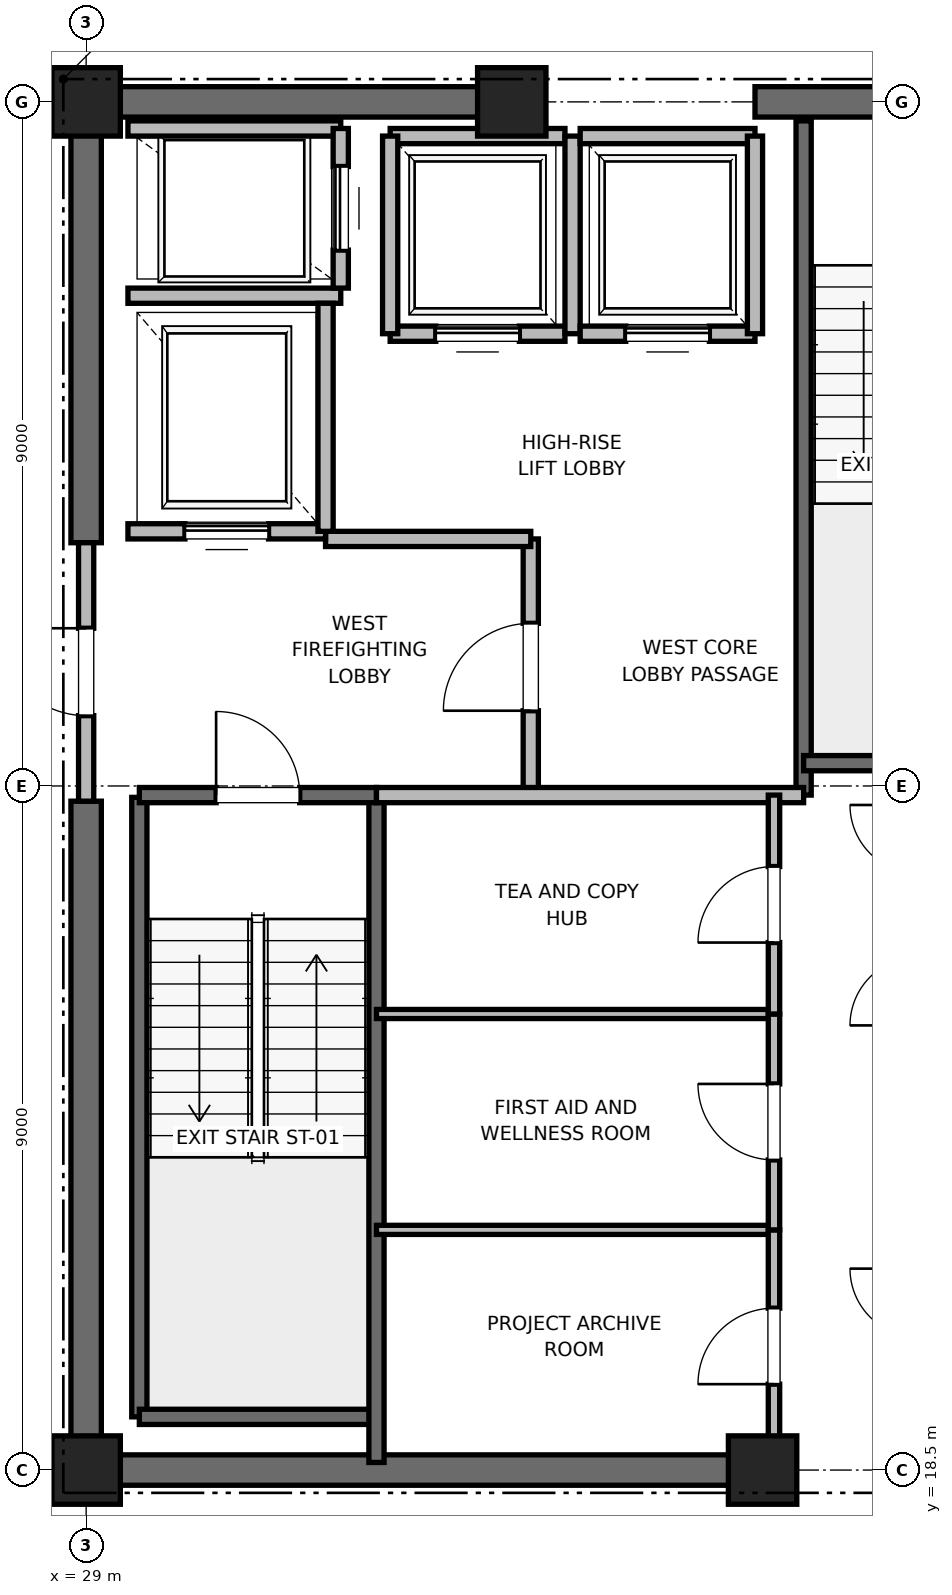
"""IFC4 building model, lengths in metres.
Left out: names, types, materials, properties, quantities, classifications, styles, units other than length and angle.
Written with IfcOpenShell. Run it as: python <this file> out.ifc"""

import sys

from ifc_helpers import new_model, si_unit, direction, frame, frame_2d, origin, origin_2d, place, context, subcontext, project, spatial, rectangle, extrude, element, fill, save


model = new_model("IFC4")
c1 = context("Model", 3, precision=1e-05, world=origin(), true_north=direction((0.0, 1.0)))
c2 = subcontext(c1, "Body", "Model", "MODEL_VIEW")
j1 = project(units=[si_unit("LENGTHUNIT", "METRE"), si_unit("PLANEANGLEUNIT", "RADIAN")], contexts=[c1])
p1 = place(None, origin())
s1 = spatial("IfcSite", under=j1, at=p1, CompositionType="ELEMENT")
p2 = place(p1, origin())
s2 = spatial("IfcBuilding", under=s1, at=p2, CompositionType="ELEMENT")
p3 = place(p2, frame((0.0, 0.0, 330.8)))
s3 = spatial("IfcBuildingStorey", under=s2, at=p3, CompositionType="ELEMENT", Elevation=330.8)
for number, where, z_axis, x_axis in (
    (1, (29.0, 18.5, 0.0), (0.0, 0.0, 1.0), (1.0, 0.0, 0.0)),
    (2, (29.0, 36.5, 0.0), (0.0, 0.0, 1.0), (1.0, 0.0, 0.0)),
    (3, (37.9, 18.5, 0.0), (0.0, 0.0, 1.0), (1.0, 0.0, 0.0)),
    (4, (34.6, 36.5, 0.0), (0.0, 0.0, 1.0), (1.0, 0.0, 0.0)),
):
    element("IfcColumn", number, at=place(p3, frame(where, z_axis=z_axis, x_axis=x_axis)), inside=s3, PredefinedType="PILASTER", context=c2, shape_type="SweptSolid", body=[
        extrude(rectangle(XDim=0.9, YDim=0.9, at=origin_2d()), origin(), (0.0, 0.0, 1.0), 4.0),
    ])
p4 = place(p3, frame((29.0, 18.5, 0.0), z_axis=(0.0, 0.0, 1.0), x_axis=(1.0, 0.0, 0.0)))
e5 = element("IfcWall", 5, at=p4, inside=s3, PredefinedType="SHEAR", context=c2, shape_type="SweptSolid", body=[
    extrude(rectangle(XDim=9.2, YDim=0.4, at=frame_2d((4.6, 0.0))), origin(), (0.0, 0.0, 1.0), 3.785),
])
p5 = place(p3, frame((29.0, 36.5, 0.0), z_axis=(0.0, 0.0, 1.0), x_axis=(1.0, 0.0, 0.0)))
e6 = element("IfcWall", 6, at=p5, inside=s3, PredefinedType="SHEAR", context=c2, shape_type="SweptSolid", body=[
    extrude(rectangle(XDim=5.8, YDim=0.4, at=frame_2d((2.9, 0.0))), origin(), (0.0, 0.0, 1.0), 3.785),
])
p6 = place(p3, frame((37.8, 36.5, 0.0), z_axis=(0.0, 0.0, 1.0), x_axis=(1.0, 0.0, 0.0)))
e7 = element("IfcWall", 7, at=p6, inside=s3, PredefinedType="SHEAR", context=c2, shape_type="SweptSolid", body=[
    extrude(rectangle(XDim=4.4, YDim=0.4, at=frame_2d((2.2, 0.0))), origin(), (0.0, 0.0, 1.0), 3.785),
])
p7 = place(p6, frame((1.65, 0.0, 0.0)))
e8 = element("IfcOpeningElement", 8, at=p7, cuts=e7, PredefinedType="OPENING", context=c2, shape_type="SweptSolid", body=[
    extrude(rectangle(XDim=1.1, YDim=2.15, at=frame_2d((0.55, 1.075))), frame((0.0, 0.2, 0.0), z_axis=(0.0, -1.0, 0.0), x_axis=(1.0, 0.0, 0.0)), (0.0, 0.0, 1.0), 0.4),
])
p8 = place(p3, frame((29.0, 18.5, 0.0), z_axis=(0.0, 0.0, 1.0), x_axis=(0.0, 1.0, 0.0)))
e9 = element("IfcWall", 9, at=p8, inside=s3, PredefinedType="SHEAR", context=c2, shape_type="SweptSolid", body=[
    extrude(rectangle(XDim=8.8, YDim=0.4, at=frame_2d((4.4, 0.0))), origin(), (0.0, 0.0, 1.0), 3.785),
])
p9 = place(p3, frame((29.0, 30.7, 0.0), z_axis=(0.0, 0.0, 1.0), x_axis=(0.0, 1.0, 0.0)))
e10 = element("IfcWall", 10, at=p9, inside=s3, PredefinedType="SHEAR", context=c2, shape_type="SweptSolid", body=[
    extrude(rectangle(XDim=5.8, YDim=0.4, at=frame_2d((2.9, 0.0))), origin(), (0.0, 0.0, 1.0), 3.785),
])
p10 = place(p3, frame((29.7, 19.2, 0.0), z_axis=(0.0, 0.0, 1.0), x_axis=(0.0, 1.0, 0.0)))
e11 = element("IfcWall", 11, at=p10, inside=s3, PredefinedType="SOLIDWALL", context=c2, shape_type="SweptSolid", body=[
    extrude(rectangle(XDim=8.15, YDim=0.2, at=frame_2d((4.075, 0.0))), origin(), (0.0, 0.0, 1.0), 3.785),
])
p11 = place(p3, frame((29.7, 19.2, 0.0), z_axis=(0.0, 0.0, 1.0), x_axis=(1.0, 0.0, 0.0)))
e12 = element("IfcWall", 12, at=p11, inside=s3, PredefinedType="SOLIDWALL", context=c2, shape_type="SweptSolid", body=[
    extrude(rectangle(XDim=3.12, YDim=0.2, at=frame_2d((1.56, 0.0))), origin(), (0.0, 0.0, 1.0), 3.785),
])
p12 = place(p3, frame((32.82, 18.6, 0.0), z_axis=(0.0, 0.0, 1.0), x_axis=(0.0, 1.0, 0.0)))
e13 = element("IfcWall", 13, at=p12, inside=s3, PredefinedType="SOLIDWALL", context=c2, shape_type="SweptSolid", body=[
    extrude(rectangle(XDim=8.78, YDim=0.2, at=frame_2d((4.39, 0.0))), origin(), (0.0, 0.0, 1.0), 3.785),
])
p13 = place(p3, frame((29.7, 27.38, 0.0), z_axis=(0.0, 0.0, 1.0), x_axis=(1.0, 0.0, 0.0)))
e14 = element("IfcWall", 14, at=p13, inside=s3, PredefinedType="SOLIDWALL", context=c2, shape_type="SweptSolid", body=[
    extrude(rectangle(XDim=3.12, YDim=0.2, at=frame_2d((1.56, 0.0))), origin(), (0.0, 0.0, 1.0), 3.785),
])
p14 = place(p13, frame((1.01, 0.0, 0.0)))
e15 = element("IfcOpeningElement", 15, at=p14, cuts=e14, PredefinedType="OPENING", context=c2, shape_type="SweptSolid", body=[
    extrude(rectangle(XDim=1.1, YDim=2.15, at=frame_2d((0.55, 1.075))), frame((0.0, 0.1, 0.0), z_axis=(0.0, -1.0, 0.0), x_axis=(1.0, 0.0, 0.0)), (0.0, 0.0, 1.0), 0.2),
])
p15 = place(p3, frame((38.44, 27.38, 0.0), z_axis=(0.0, 0.0, 1.0), x_axis=(0.0, 1.0, 0.0)))
e16 = element("IfcWall", 16, at=p15, inside=s3, PredefinedType="SOLIDWALL", context=c2, shape_type="SweptSolid", body=[
    extrude(rectangle(XDim=8.87, YDim=0.2, at=frame_2d((4.435, 0.0))), origin(), (0.0, 0.0, 1.0), 3.785),
])
p16 = place(p3, frame((38.44, 27.8, 0.0), z_axis=(0.0, 0.0, 1.0), x_axis=(1.0, 0.0, 0.0)))
e17 = element("IfcWall", 17, at=p16, inside=s3, PredefinedType="SOLIDWALL", context=c2, shape_type="SweptSolid", body=[
    extrude(rectangle(XDim=3.32, YDim=0.2, at=frame_2d((1.66, 0.0))), origin(), (0.0, 0.0, 1.0), 3.785),
])
p17 = place(p3, frame((34.85, 27.38, 0.0), z_axis=(0.0, 0.0, 1.0), x_axis=(0.0, 1.0, 0.0)))
e18 = element("IfcWall", 18, at=p17, inside=s3, PredefinedType="PARTITIONING", context=c2, shape_type="SweptSolid", body=[
    extrude(rectangle(XDim=3.37, YDim=0.2, at=frame_2d((1.685, 0.0))), origin(), (0.0, 0.0, 1.0), 3.785),
])
p18 = place(p17, frame((1.11, 0.0, 0.0)))
e19 = element("IfcOpeningElement", 19, at=p18, cuts=e18, PredefinedType="OPENING", context=c2, shape_type="SweptSolid", body=[
    extrude(rectangle(XDim=1.15, YDim=2.2, at=frame_2d((0.575, 1.1))), frame((0.0, 0.1, 0.0), z_axis=(0.0, -1.0, 0.0), x_axis=(1.0, 0.0, 0.0)), (0.0, 0.0, 1.0), 0.2),
])
p19 = place(p3, frame((29.0, 27.3, 0.0), z_axis=(0.0, 0.0, 1.0), x_axis=(0.0, 1.0, 0.0)))
e20 = element("IfcWall", 20, at=p19, inside=s3, PredefinedType="PARTITIONING", context=c2, shape_type="SweptSolid", body=[
    extrude(rectangle(XDim=3.4, YDim=0.2, at=frame_2d((1.7, 0.0))), origin(), (0.0, 0.0, 1.0), 2.865),
])
p20 = place(p19, frame((1.125, 0.0, 0.0)))
e21 = element("IfcOpeningElement", 21, at=p20, cuts=e20, PredefinedType="OPENING", context=c2, shape_type="SweptSolid", body=[
    extrude(rectangle(XDim=1.15, YDim=2.2, at=frame_2d((0.575, 1.1))), frame((0.0, 0.1, 0.0), z_axis=(0.0, -1.0, 0.0), x_axis=(1.0, 0.0, 0.0)), (0.0, 0.0, 1.0), 0.2),
])
p21 = place(p3, frame((32.82, 27.38, 0.0), z_axis=(0.0, 0.0, 1.0), x_axis=(1.0, 0.0, 0.0)))
e22 = element("IfcWall", 22, at=p21, inside=s3, PredefinedType="PARTITIONING", context=c2, shape_type="SweptSolid", body=[
    extrude(rectangle(XDim=5.62, YDim=0.2, at=frame_2d((2.81, 0.0))), origin(), (0.0, 0.0, 1.0), 3.785),
])
p22 = place(p3, frame((32.15, 30.75, 0.0), z_axis=(0.0, 0.0, 1.0), x_axis=(1.0, 0.0, 0.0)))
e23 = element("IfcWall", 23, at=p22, inside=s3, PredefinedType="PARTITIONING", context=c2, shape_type="SweptSolid", body=[
    extrude(rectangle(XDim=2.7, YDim=0.2, at=frame_2d((1.35, 0.0))), origin(), (0.0, 0.0, 1.0), 3.785),
])
p23 = place(p3, frame((29.55, 30.85, 0.0), z_axis=(0.0, 0.0, 1.0), x_axis=(1.0, 0.0, 0.0)))
e24 = element("IfcWall", 24, at=p23, inside=s3, PredefinedType="SOLIDWALL", context=c2, shape_type="SweptSolid", body=[
    extrude(rectangle(XDim=2.6, YDim=0.2, at=frame_2d((1.3, 0.0))), origin(), (0.0, 0.0, 1.0), 2.865),
])
p24 = place(p23, frame((0.75, 0.0, 0.0)))
e25 = element("IfcOpeningElement", 25, at=p24, cuts=e24, PredefinedType="OPENING", context=c2, shape_type="SweptSolid", body=[
    extrude(rectangle(XDim=1.1, YDim=2.2, at=frame_2d((0.55, 1.1))), frame((0.0, 0.1, 0.0), z_axis=(0.0, -1.0, 0.0), x_axis=(1.0, 0.0, 0.0)), (0.0, 0.0, 1.0), 0.2),
])
p25 = place(p3, frame((29.55, 33.95, 0.0), z_axis=(0.0, 0.0, 1.0), x_axis=(1.0, 0.0, 0.0)))
e26 = element("IfcWall", 26, at=p25, inside=s3, PredefinedType="SOLIDWALL", context=c2, shape_type="SweptSolid", body=[
    extrude(rectangle(XDim=2.8, YDim=0.2, at=frame_2d((1.4, 0.0))), origin(), (0.0, 0.0, 1.0), 3.785),
])
p26 = place(p3, frame((32.15, 30.85, 0.0), z_axis=(0.0, 0.0, 1.0), x_axis=(0.0, 1.0, 0.0)))
e27 = element("IfcWall", 27, at=p26, inside=s3, PredefinedType="SOLIDWALL", context=c2, shape_type="SweptSolid", body=[
    extrude(rectangle(XDim=3.0, YDim=0.2, at=frame_2d((1.5, 0.0))), origin(), (0.0, 0.0, 1.0), 3.785),
])
p27 = place(p3, frame((32.35, 36.15, 0.0), z_axis=(0.0, 0.0, 1.0), x_axis=(-1.0, 0.0, 0.0)))
e28 = element("IfcWall", 28, at=p27, inside=s3, PredefinedType="SOLIDWALL", context=c2, shape_type="SweptSolid", body=[
    extrude(rectangle(XDim=2.8, YDim=0.2, at=frame_2d((1.4, 0.0))), origin(), (0.0, 0.0, 1.0), 3.22),
])
p28 = place(p3, frame((32.35, 34.05, 0.0), z_axis=(0.0, 0.0, 1.0), x_axis=(0.0, 1.0, 0.0)))
e29 = element("IfcWall", 29, at=p28, inside=s3, PredefinedType="SOLIDWALL", context=c2, shape_type="SweptSolid", body=[
    extrude(rectangle(XDim=2.1, YDim=0.2, at=frame_2d((1.05, 0.0))), origin(), (0.0, 0.0, 1.0), 3.785),
])
p29 = place(p28, frame((0.5, 0.0, 0.0)))
e30 = element("IfcOpeningElement", 30, at=p29, cuts=e29, PredefinedType="OPENING", context=c2, shape_type="SweptSolid", body=[
    extrude(rectangle(XDim=1.1, YDim=2.2, at=frame_2d((0.55, 1.1))), frame((0.0, 0.1, 0.0), z_axis=(0.0, -1.0, 0.0), x_axis=(1.0, 0.0, 0.0)), (0.0, 0.0, 1.0), 0.2),
])
p30 = place(p3, frame((33.0, 33.45, 0.0), z_axis=(0.0, 0.0, 1.0), x_axis=(1.0, 0.0, 0.0)))
e31 = element("IfcWall", 31, at=p30, inside=s3, PredefinedType="SOLIDWALL", context=c2, shape_type="SweptSolid", body=[
    extrude(rectangle(XDim=2.3, YDim=0.2, at=frame_2d((1.15, 0.0))), origin(), (0.0, 0.0, 1.0), 3.785),
])
p31 = place(p30, frame((0.6, 0.0, 0.0)))
e32 = element("IfcOpeningElement", 32, at=p31, cuts=e31, PredefinedType="OPENING", context=c2, shape_type="SweptSolid", body=[
    extrude(rectangle(XDim=1.1, YDim=2.2, at=frame_2d((0.55, 1.1))), frame((0.0, 0.1, 0.0), z_axis=(0.0, -1.0, 0.0), x_axis=(1.0, 0.0, 0.0)), (0.0, 0.0, 1.0), 0.2),
])
p32 = place(p3, frame((35.3, 36.05, 0.0), z_axis=(0.0, 0.0, 1.0), x_axis=(-1.0, 0.0, 0.0)))
e33 = element("IfcWall", 33, at=p32, inside=s3, PredefinedType="SOLIDWALL", context=c2, shape_type="SweptSolid", body=[
    extrude(rectangle(XDim=2.3, YDim=0.2, at=frame_2d((1.15, 0.0))), origin(), (0.0, 0.0, 1.0), 2.865),
])
p33 = place(p3, frame((33.0, 36.05, 0.0), z_axis=(0.0, 0.0, 1.0), x_axis=(0.0, -1.0, 0.0)))
e34 = element("IfcWall", 34, at=p33, inside=s3, PredefinedType="SOLIDWALL", context=c2, shape_type="SweptSolid", body=[
    extrude(rectangle(XDim=2.6, YDim=0.2, at=frame_2d((1.3, 0.0))), origin(), (0.0, 0.0, 1.0), 3.785),
])
p34 = place(p3, frame((35.4, 33.45, 0.0), z_axis=(0.0, 0.0, 1.0), x_axis=(0.0, 1.0, 0.0)))
e35 = element("IfcWall", 35, at=p34, inside=s3, PredefinedType="SOLIDWALL", context=c2, shape_type="SweptSolid", body=[
    extrude(rectangle(XDim=2.6, YDim=0.2, at=frame_2d((1.3, 0.0))), origin(), (0.0, 0.0, 1.0), 2.865),
])
p35 = place(p3, frame((35.5, 33.45, 0.0), z_axis=(0.0, 0.0, 1.0), x_axis=(1.0, 0.0, 0.0)))
e36 = element("IfcWall", 36, at=p35, inside=s3, PredefinedType="SOLIDWALL", context=c2, shape_type="SweptSolid", body=[
    extrude(rectangle(XDim=2.3, YDim=0.2, at=frame_2d((1.15, 0.0))), origin(), (0.0, 0.0, 1.0), 3.785),
])
p36 = place(p35, frame((0.6, 0.0, 0.0)))
e37 = element("IfcOpeningElement", 37, at=p36, cuts=e36, PredefinedType="OPENING", context=c2, shape_type="SweptSolid", body=[
    extrude(rectangle(XDim=1.1, YDim=2.2, at=frame_2d((0.55, 1.1))), frame((0.0, 0.1, 0.0), z_axis=(0.0, -1.0, 0.0), x_axis=(1.0, 0.0, 0.0)), (0.0, 0.0, 1.0), 0.2),
])
p37 = place(p3, frame((37.8, 36.05, 0.0), z_axis=(0.0, 0.0, 1.0), x_axis=(-1.0, 0.0, 0.0)))
e38 = element("IfcWall", 38, at=p37, inside=s3, PredefinedType="SOLIDWALL", context=c2, shape_type="SweptSolid", body=[
    extrude(rectangle(XDim=2.3, YDim=0.2, at=frame_2d((1.15, 0.0))), origin(), (0.0, 0.0, 1.0), 2.865),
])
p38 = place(p3, frame((37.8, 33.45, 0.0), z_axis=(0.0, 0.0, 1.0), x_axis=(0.0, 1.0, 0.0)))
e39 = element("IfcWall", 39, at=p38, inside=s3, PredefinedType="SOLIDWALL", context=c2, shape_type="SweptSolid", body=[
    extrude(rectangle(XDim=2.6, YDim=0.2, at=frame_2d((1.3, 0.0))), origin(), (0.0, 0.0, 1.0), 2.865),
])
for number, where, z_axis, x_axis in (
    (40, (32.82, 21.66, 0.0), (0.0, 0.0, 1.0), (1.0, 0.0, 0.0)),
    (41, (32.82, 24.5, 0.0), (0.0, 0.0, 1.0), (1.0, 0.0, 0.0)),
):
    element("IfcWall", number, at=place(p3, frame(where, z_axis=z_axis, x_axis=x_axis)), inside=s3, PredefinedType="PARTITIONING", context=c2, shape_type="SweptSolid", body=[
        extrude(rectangle(XDim=5.23, YDim=0.12, at=frame_2d((2.615, 0.0))), origin(), (0.0, 0.0, 1.0), 2.85),
    ])
p39 = place(p3, frame((38.05, 18.6, 0.0), z_axis=(0.0, 0.0, 1.0), x_axis=(0.0, 1.0, 0.0)))
e42 = element("IfcWall", 42, at=p39, inside=s3, PredefinedType="PARTITIONING", context=c2, shape_type="SweptSolid", body=[
    extrude(rectangle(XDim=3.06, YDim=0.15, at=frame_2d((1.53, 0.0))), origin(), (0.0, 0.0, 1.0), 2.85),
])
p40 = place(p39, frame((1.03, 0.0, 0.0)))
e43 = element("IfcOpeningElement", 43, at=p40, cuts=e42, PredefinedType="OPENING", context=c2, shape_type="SweptSolid", body=[
    extrude(rectangle(XDim=1.0, YDim=2.15, at=frame_2d((0.5, 1.075))), frame((0.0, 0.075, 0.0), z_axis=(0.0, -1.0, 0.0), x_axis=(1.0, 0.0, 0.0)), (0.0, 0.0, 1.0), 0.15),
])
p41 = place(p3, frame((38.05, 21.66, 0.0), z_axis=(0.0, 0.0, 1.0), x_axis=(0.0, 1.0, 0.0)))
e44 = element("IfcWall", 44, at=p41, inside=s3, PredefinedType="PARTITIONING", context=c2, shape_type="SweptSolid", body=[
    extrude(rectangle(XDim=2.84, YDim=0.15, at=frame_2d((1.42, 0.0))), origin(), (0.0, 0.0, 1.0), 2.85),
])
p42 = place(p41, frame((0.92, 0.0, 0.0)))
e45 = element("IfcOpeningElement", 45, at=p42, cuts=e44, PredefinedType="OPENING", context=c2, shape_type="SweptSolid", body=[
    extrude(rectangle(XDim=1.0, YDim=2.15, at=frame_2d((0.5, 1.075))), frame((0.0, 0.075, 0.0), z_axis=(0.0, -1.0, 0.0), x_axis=(1.0, 0.0, 0.0)), (0.0, 0.0, 1.0), 0.15),
])
p43 = place(p3, frame((38.05, 24.5, 0.0), z_axis=(0.0, 0.0, 1.0), x_axis=(0.0, 1.0, 0.0)))
e46 = element("IfcWall", 46, at=p43, inside=s3, PredefinedType="PARTITIONING", context=c2, shape_type="SweptSolid", body=[
    extrude(rectangle(XDim=2.88, YDim=0.15, at=frame_2d((1.44, 0.0))), origin(), (0.0, 0.0, 1.0), 2.85),
])
p44 = place(p43, frame((0.94, 0.0, 0.0)))
e47 = element("IfcOpeningElement", 47, at=p44, cuts=e46, PredefinedType="OPENING", context=c2, shape_type="SweptSolid", body=[
    extrude(rectangle(XDim=1.0, YDim=2.15, at=frame_2d((0.5, 1.075))), frame((0.0, 0.075, 0.0), z_axis=(0.0, -1.0, 0.0), x_axis=(1.0, 0.0, 0.0)), (0.0, 0.0, 1.0), 0.15),
])
p45 = place(p14, origin())
e48 = element("IfcDoor", 48, at=p45, inside=s3, OperationType="SINGLE_SWING_LEFT", PredefinedType="DOOR", context=c2, shape_type="SweptSolid", body=[
    extrude(rectangle(XDim=1.1, YDim=2.15, at=frame_2d((0.55, 1.075))), frame((0.0, 0.025, 0.0), z_axis=(0.0, -1.0, 0.0), x_axis=(1.0, 0.0, 0.0)), (0.0, 0.0, 1.0), 0.05),
])
fill(e15, e48)
p46 = place(p18, origin())
e49 = element("IfcDoor", 49, at=p46, inside=s3, OperationType="SINGLE_SWING_LEFT", PredefinedType="DOOR", context=c2, shape_type="SweptSolid", body=[
    extrude(rectangle(XDim=1.15, YDim=2.2, at=frame_2d((0.575, 1.1))), frame((0.0, 0.025, 0.0), z_axis=(0.0, -1.0, 0.0), x_axis=(1.0, 0.0, 0.0)), (0.0, 0.0, 1.0), 0.05),
])
fill(e19, e49)
p47 = place(p20, origin())
e50 = element("IfcDoor", 50, at=p47, inside=s3, OperationType="SINGLE_SWING_RIGHT", PredefinedType="DOOR", context=c2, shape_type="SweptSolid", body=[
    extrude(rectangle(XDim=1.15, YDim=2.2, at=frame_2d((0.575, 1.1))), frame((0.0, 0.025, 0.0), z_axis=(0.0, -1.0, 0.0), x_axis=(1.0, 0.0, 0.0)), (0.0, 0.0, 1.0), 0.05),
])
fill(e21, e50)
p48 = place(p24, origin())
e51 = element("IfcDoor", 51, at=p48, inside=s3, OperationType="SLIDING_TO_RIGHT", PredefinedType="DOOR", context=c2, shape_type="SweptSolid", body=[
    extrude(rectangle(XDim=1.1, YDim=2.2, at=frame_2d((0.55, 1.1))), frame((0.0, 0.025, 0.0), z_axis=(0.0, -1.0, 0.0), x_axis=(1.0, 0.0, 0.0)), (0.0, 0.0, 1.0), 0.05),
])
fill(e25, e51)
p49 = place(p29, origin())
e52 = element("IfcDoor", 52, at=p49, inside=s3, OperationType="SLIDING_TO_RIGHT", PredefinedType="DOOR", context=c2, shape_type="SweptSolid", body=[
    extrude(rectangle(XDim=1.1, YDim=2.2, at=frame_2d((0.55, 1.1))), frame((0.0, 0.025, 0.0), z_axis=(0.0, -1.0, 0.0), x_axis=(1.0, 0.0, 0.0)), (0.0, 0.0, 1.0), 0.05),
])
fill(e30, e52)
p50 = place(p31, origin())
e53 = element("IfcDoor", 53, at=p50, inside=s3, OperationType="SLIDING_TO_RIGHT", PredefinedType="DOOR", context=c2, shape_type="SweptSolid", body=[
    extrude(rectangle(XDim=1.1, YDim=2.2, at=frame_2d((0.55, 1.1))), frame((0.0, 0.025, 0.0), z_axis=(0.0, -1.0, 0.0), x_axis=(1.0, 0.0, 0.0)), (0.0, 0.0, 1.0), 0.05),
])
fill(e32, e53)
p51 = place(p36, origin())
e54 = element("IfcDoor", 54, at=p51, inside=s3, OperationType="SLIDING_TO_RIGHT", PredefinedType="DOOR", context=c2, shape_type="SweptSolid", body=[
    extrude(rectangle(XDim=1.1, YDim=2.2, at=frame_2d((0.55, 1.1))), frame((0.0, 0.025, 0.0), z_axis=(0.0, -1.0, 0.0), x_axis=(1.0, 0.0, 0.0)), (0.0, 0.0, 1.0), 0.05),
])
fill(e37, e54)
p52 = place(p40, origin())
e55 = element("IfcDoor", 55, at=p52, inside=s3, OperationType="SINGLE_SWING_LEFT", PredefinedType="DOOR", context=c2, shape_type="SweptSolid", body=[
    extrude(rectangle(XDim=1.0, YDim=2.15, at=frame_2d((0.5, 1.075))), frame((0.0, 0.025, 0.0), z_axis=(0.0, -1.0, 0.0), x_axis=(1.0, 0.0, 0.0)), (0.0, 0.0, 1.0), 0.05),
])
fill(e43, e55)
p53 = place(p42, origin())
e56 = element("IfcDoor", 56, at=p53, inside=s3, OperationType="SINGLE_SWING_RIGHT", PredefinedType="DOOR", context=c2, shape_type="SweptSolid", body=[
    extrude(rectangle(XDim=1.0, YDim=2.15, at=frame_2d((0.5, 1.075))), frame((0.0, 0.025, 0.0), z_axis=(0.0, -1.0, 0.0), x_axis=(1.0, 0.0, 0.0)), (0.0, 0.0, 1.0), 0.05),
])
fill(e45, e56)
p54 = place(p44, origin())
e57 = element("IfcDoor", 57, at=p54, inside=s3, OperationType="SINGLE_SWING_LEFT", PredefinedType="DOOR", context=c2, shape_type="SweptSolid", body=[
    extrude(rectangle(XDim=1.0, YDim=2.15, at=frame_2d((0.5, 1.075))), frame((0.0, 0.025, 0.0), z_axis=(0.0, -1.0, 0.0), x_axis=(1.0, 0.0, 0.0)), (0.0, 0.0, 1.0), 0.05),
])
fill(e47, e57)
save(model, sys.argv[1])
